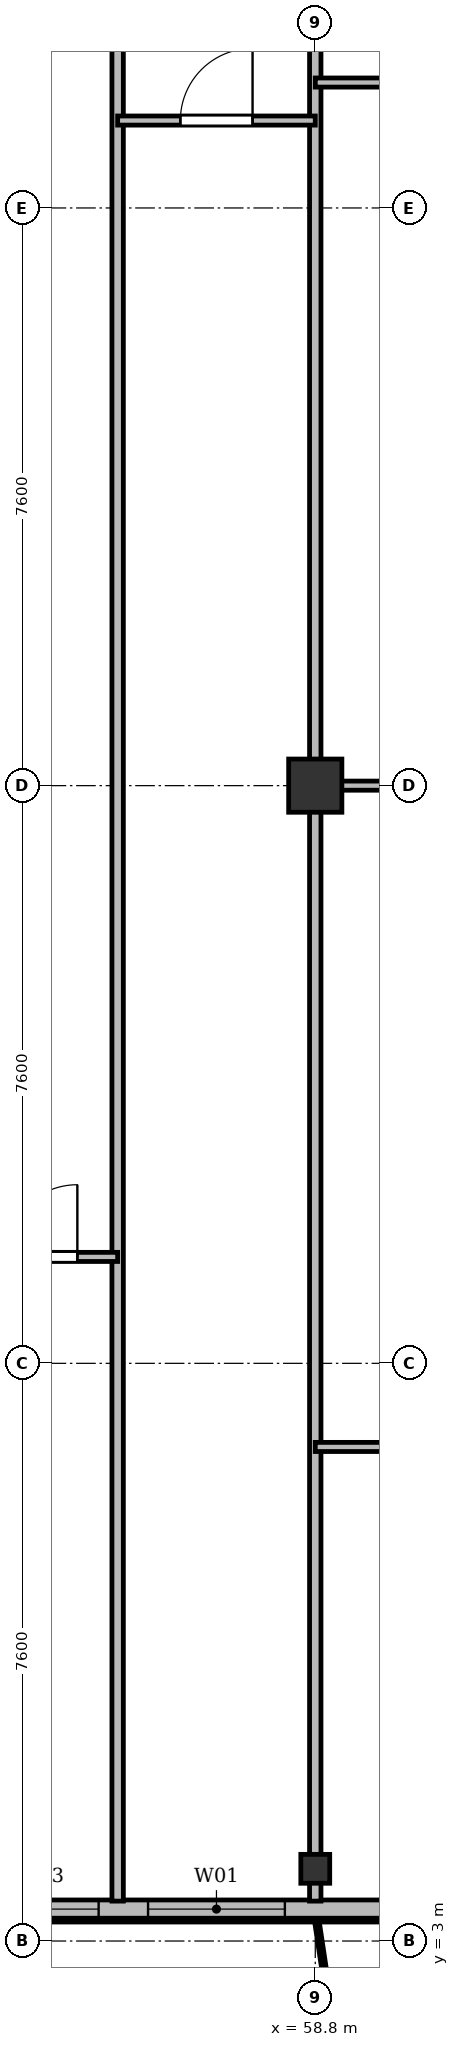
"""IFC4 building model, lengths in metres.
Left out: names, types, materials, properties, quantities, classifications, styles, units other than length and angle.
Written with IfcOpenShell. Run it as: python <this file> out.ifc"""

import sys

from ifc_helpers import new_model, si_unit, direction, frame, frame_2d, origin, origin_2d, place, context, subcontext, project, spatial, rectangle, i_section, extrude, source, transform, mapped, element, fill, save


model = new_model("IFC4")
c1 = context("Model", 3, precision=1e-05, world=origin(), true_north=direction((0.0, 1.0)))
c2 = subcontext(c1, "Body", "Model", "MODEL_VIEW")
j1 = project(units=[si_unit("LENGTHUNIT", "METRE"), si_unit("PLANEANGLEUNIT", "RADIAN")], contexts=[c1])
p1 = place(None, origin())
s1 = spatial("IfcSite", under=j1, at=p1, CompositionType="ELEMENT")
p2 = place(p1, origin())
s2 = spatial("IfcBuilding", under=s1, at=p2, CompositionType="ELEMENT")
p3 = place(p2, frame((0.0, 0.0, 168.1)))
s3 = spatial("IfcBuildingStorey", under=s2, at=p3, CompositionType="ELEMENT", Elevation=168.1)
m1 = source(origin(), c2, "Body", "SweptSolid", [
    extrude(i_section(OverallWidth=0.38, OverallDepth=0.38, WebThickness=0.02, FlangeThickness=0.03, at=origin_2d()), origin(), (0.0, 0.0, 1.0), 3.6),
])
p4 = place(p3, frame((58.8, 3.95, 0.0), z_axis=(0.0, 0.0, 1.0), x_axis=(1.0, 0.0, 0.0)))
e1 = element("IfcColumn", 1, at=p4, inside=s3, PredefinedType="COLUMN", context=c2, shape_type="MappedRepresentation", body=[
    mapped(m1, transform((0.0, 0.0, 0.0), x_axis=(1.0, 0.0, 0.0), y_axis=(0.0, 1.0, 0.0), z_axis=(0.0, 0.0, 1.0), scale=1.0)),
])
m2 = source(origin(), c2, "Body", "SweptSolid", [
    extrude(rectangle(XDim=0.7, YDim=0.7, at=origin_2d()), origin(), (0.0, 0.0, 1.0), 3.6),
])
p5 = place(p3, frame((58.8, 18.2, 0.0), z_axis=(0.0, 0.0, 1.0), x_axis=(1.0, 0.0, 0.0)))
e2 = element("IfcColumn", 2, at=p5, inside=s3, PredefinedType="COLUMN", context=c2, shape_type="MappedRepresentation", body=[
    mapped(m2, transform((0.0, 0.0, 0.0), x_axis=(1.0, 0.0, 0.0), y_axis=(0.0, 1.0, 0.0), z_axis=(0.0, 0.0, 1.0), scale=1.0)),
])
p6 = place(p3, frame((63.6, 3.42, 0.0), z_axis=(0.0, 0.0, 1.0), x_axis=(-1.0, 0.0, 0.0)))
e3 = element("IfcWall", 3, at=p6, inside=s3, PredefinedType="SOLIDWALL", context=c2, shape_type="SweptSolid", body=[
    extrude(rectangle(XDim=52.8, YDim=0.24, at=frame_2d((26.4, 0.0))), origin(), (0.0, 0.0, 1.0), 3.35),
])
p7 = place(p6, frame((1.62, 0.0, 0.9)))
e4 = element("IfcOpeningElement", 4, at=p7, cuts=e3, PredefinedType="OPENING", context=c2, shape_type="SweptSolid", body=[
    extrude(rectangle(XDim=1.65, YDim=1.85, at=frame_2d((0.825, 0.925))), frame((0.0, 0.13, 0.0), z_axis=(0.0, -1.0, 0.0), x_axis=(1.0, 0.0, 0.0)), (0.0, 0.0, 1.0), 0.26),
])
p8 = place(p6, frame((5.2, 0.0, 0.9)))
e5 = element("IfcOpeningElement", 5, at=p8, cuts=e3, PredefinedType="OPENING", context=c2, shape_type="SweptSolid", body=[
    extrude(rectangle(XDim=1.8, YDim=1.8, at=frame_2d((0.9, 0.9))), frame((0.0, 0.13, 0.0), z_axis=(0.0, -1.0, 0.0), x_axis=(1.0, 0.0, 0.0)), (0.0, 0.0, 1.0), 0.26),
])
p9 = place(p6, frame((7.65, 0.0, 0.9)))
e6 = element("IfcOpeningElement", 6, at=p9, cuts=e3, PredefinedType="OPENING", context=c2, shape_type="SweptSolid", body=[
    extrude(rectangle(XDim=1.5, YDim=1.75, at=frame_2d((0.75, 0.875))), frame((0.0, 0.13, 0.0), z_axis=(0.0, -1.0, 0.0), x_axis=(1.0, 0.0, 0.0)), (0.0, 0.0, 1.0), 0.26),
])
p10 = place(p6, frame((10.25, 0.0, 0.9)))
e7 = element("IfcOpeningElement", 7, at=p10, cuts=e3, PredefinedType="OPENING", context=c2, shape_type="SweptSolid", body=[
    extrude(rectangle(XDim=1.5, YDim=1.75, at=frame_2d((0.75, 0.875))), frame((0.0, 0.13, 0.0), z_axis=(0.0, -1.0, 0.0), x_axis=(1.0, 0.0, 0.0)), (0.0, 0.0, 1.0), 0.26),
])
p11 = place(p6, frame((13.62, 0.0, 0.0)))
e8 = element("IfcOpeningElement", 8, at=p11, cuts=e3, PredefinedType="OPENING", context=c2, shape_type="SweptSolid", body=[
    extrude(rectangle(XDim=1.2, YDim=2.2, at=frame_2d((0.6, 1.1))), frame((0.0, 0.13, 0.0), z_axis=(0.0, -1.0, 0.0), x_axis=(1.0, 0.0, 0.0)), (0.0, 0.0, 1.0), 0.26),
])
p12 = place(p6, frame((15.375, 0.0, 0.9)))
e9 = element("IfcOpeningElement", 9, at=p12, cuts=e3, PredefinedType="OPENING", context=c2, shape_type="SweptSolid", body=[
    extrude(rectangle(XDim=1.65, YDim=1.85, at=frame_2d((0.825, 0.925))), frame((0.0, 0.13, 0.0), z_axis=(0.0, -1.0, 0.0), x_axis=(1.0, 0.0, 0.0)), (0.0, 0.0, 1.0), 0.26),
])
p13 = place(p6, frame((17.7, 0.0, 0.9)))
e10 = element("IfcOpeningElement", 10, at=p13, cuts=e3, PredefinedType="OPENING", context=c2, shape_type="SweptSolid", body=[
    extrude(rectangle(XDim=1.8, YDim=1.8, at=frame_2d((0.9, 0.9))), frame((0.0, 0.13, 0.0), z_axis=(0.0, -1.0, 0.0), x_axis=(1.0, 0.0, 0.0)), (0.0, 0.0, 1.0), 0.26),
])
p14 = place(p6, frame((22.0, 0.0, 0.9)))
e11 = element("IfcOpeningElement", 11, at=p14, cuts=e3, PredefinedType="OPENING", context=c2, shape_type="SweptSolid", body=[
    extrude(rectangle(XDim=2.2, YDim=1.8, at=frame_2d((1.1, 0.9))), frame((0.0, 0.13, 0.0), z_axis=(0.0, -1.0, 0.0), x_axis=(1.0, 0.0, 0.0)), (0.0, 0.0, 1.0), 0.26),
])
p15 = place(p6, frame((28.95, 0.0, 0.9)))
e12 = element("IfcOpeningElement", 12, at=p15, cuts=e3, PredefinedType="OPENING", context=c2, shape_type="SweptSolid", body=[
    extrude(rectangle(XDim=1.5, YDim=1.75, at=frame_2d((0.75, 0.875))), frame((0.0, 0.13, 0.0), z_axis=(0.0, -1.0, 0.0), x_axis=(1.0, 0.0, 0.0)), (0.0, 0.0, 1.0), 0.26),
])
p16 = place(p6, frame((35.6, 0.0, 0.9)))
e13 = element("IfcOpeningElement", 13, at=p16, cuts=e3, PredefinedType="OPENING", context=c2, shape_type="SweptSolid", body=[
    extrude(rectangle(XDim=2.0, YDim=1.95, at=frame_2d((1.0, 0.975))), frame((0.0, 0.13, 0.0), z_axis=(0.0, -1.0, 0.0), x_axis=(1.0, 0.0, 0.0)), (0.0, 0.0, 1.0), 0.26),
])
p17 = place(p6, frame((41.656, 0.0, 0.0)))
e14 = element("IfcOpeningElement", 14, at=p17, cuts=e3, PredefinedType="OPENING", context=c2, shape_type="SweptSolid", body=[
    extrude(rectangle(XDim=1.2, YDim=2.2, at=frame_2d((0.6, 1.1))), frame((0.0, 0.13, 0.0), z_axis=(0.0, -1.0, 0.0), x_axis=(1.0, 0.0, 0.0)), (0.0, 0.0, 1.0), 0.26),
])
p18 = place(p6, frame((43.65, 0.0, 0.9)))
e15 = element("IfcOpeningElement", 15, at=p18, cuts=e3, PredefinedType="OPENING", context=c2, shape_type="SweptSolid", body=[
    extrude(rectangle(XDim=1.5, YDim=1.75, at=frame_2d((0.75, 0.875))), frame((0.0, 0.13, 0.0), z_axis=(0.0, -1.0, 0.0), x_axis=(1.0, 0.0, 0.0)), (0.0, 0.0, 1.0), 0.26),
])
p19 = place(p6, frame((45.95, 0.0, 0.9)))
e16 = element("IfcOpeningElement", 16, at=p19, cuts=e3, PredefinedType="OPENING", context=c2, shape_type="SweptSolid", body=[
    extrude(rectangle(XDim=1.5, YDim=1.75, at=frame_2d((0.75, 0.875))), frame((0.0, 0.13, 0.0), z_axis=(0.0, -1.0, 0.0), x_axis=(1.0, 0.0, 0.0)), (0.0, 0.0, 1.0), 0.26),
])
p20 = place(p6, frame((49.605, 0.0, 0.9)))
e17 = element("IfcOpeningElement", 17, at=p20, cuts=e3, PredefinedType="OPENING", context=c2, shape_type="SweptSolid", body=[
    extrude(rectangle(XDim=1.5, YDim=1.75, at=frame_2d((0.75, 0.875))), frame((0.0, 0.13, 0.0), z_axis=(0.0, -1.0, 0.0), x_axis=(1.0, 0.0, 0.0)), (0.0, 0.0, 1.0), 0.26),
])
p21 = place(p3, frame((58.8, 3.525, 0.0), z_axis=(0.0, 0.0, 1.0), x_axis=(0.0, 1.0, 0.0)))
e18 = element("IfcWall", 18, at=p21, inside=s3, PredefinedType="PARTITIONING", context=c2, shape_type="SweptSolid", body=[
    extrude(rectangle(XDim=27.275, YDim=0.15, at=frame_2d((13.638, 0.0))), origin(), (0.0, 0.0, 1.0), 2.85),
])
p22 = place(p3, frame((56.2, 3.525, 0.0), z_axis=(0.0, 0.0, 1.0), x_axis=(0.0, 1.0, 0.0)))
e19 = element("IfcWall", 19, at=p22, inside=s3, PredefinedType="PARTITIONING", context=c2, shape_type="SweptSolid", body=[
    extrude(rectangle(XDim=27.275, YDim=0.15, at=frame_2d((13.638, 0.0))), origin(), (0.0, 0.0, 1.0), 2.75),
])
p23 = place(p3, frame((54.2, 12.0, 0.0), z_axis=(0.0, 0.0, 1.0), x_axis=(1.0, 0.0, 0.0)))
e20 = element("IfcWall", 20, at=p23, inside=s3, PredefinedType="PARTITIONING", context=c2, shape_type="SweptSolid", body=[
    extrude(rectangle(XDim=2.0, YDim=0.12, at=frame_2d((1.0, 0.0))), origin(), (0.0, 0.0, 1.0), 3.35),
])
p24 = place(p23, frame((0.52, 0.0, 0.0)))
e21 = element("IfcOpeningElement", 21, at=p24, cuts=e20, PredefinedType="OPENING", context=c2, shape_type="SweptSolid", body=[
    extrude(rectangle(XDim=0.95, YDim=2.15, at=frame_2d((0.475, 1.075))), frame((0.0, 0.07, 0.0), z_axis=(0.0, -1.0, 0.0), x_axis=(1.0, 0.0, 0.0)), (0.0, 0.0, 1.0), 0.14),
])
p25 = place(p3, frame((56.2, 26.95, 0.0), z_axis=(0.0, 0.0, 1.0), x_axis=(1.0, 0.0, 0.0)))
e22 = element("IfcWall", 22, at=p25, inside=s3, PredefinedType="PARTITIONING", context=c2, shape_type="SweptSolid", body=[
    extrude(rectangle(XDim=2.6, YDim=0.12, at=frame_2d((1.3, 0.0))), origin(), (0.0, 0.0, 1.0), 2.85),
])
p26 = place(p25, frame((0.825, 0.0, 0.0)))
e23 = element("IfcOpeningElement", 23, at=p26, cuts=e22, PredefinedType="OPENING", context=c2, shape_type="SweptSolid", body=[
    extrude(rectangle(XDim=0.95, YDim=2.15, at=frame_2d((0.475, 1.075))), frame((0.0, 0.07, 0.0), z_axis=(0.0, -1.0, 0.0), x_axis=(1.0, 0.0, 0.0)), (0.0, 0.0, 1.0), 0.14),
])
p27 = place(p3, frame((58.8, 18.2, 0.0), z_axis=(0.0, 0.0, 1.0), x_axis=(1.0, 0.0, 0.0)))
e24 = element("IfcWall", 24, at=p27, inside=s3, PredefinedType="PARTITIONING", context=c2, shape_type="SweptSolid", body=[
    extrude(rectangle(XDim=7.56, YDim=0.12, at=frame_2d((3.78, 0.0))), origin(), (0.0, 0.0, 1.0), 2.75),
])
p28 = place(p27, frame((3.305, 0.0, 0.0)))
e25 = element("IfcOpeningElement", 25, at=p28, cuts=e24, PredefinedType="OPENING", context=c2, shape_type="SweptSolid", body=[
    extrude(rectangle(XDim=0.95, YDim=2.15, at=frame_2d((0.475, 1.075))), frame((0.0, 0.07, 0.0), z_axis=(0.0, -1.0, 0.0), x_axis=(1.0, 0.0, 0.0)), (0.0, 0.0, 1.0), 0.14),
])
p29 = place(p3, frame((58.8, 27.45, 0.0), z_axis=(0.0, 0.0, 1.0), x_axis=(1.0, 0.0, 0.0)))
e26 = element("IfcWall", 26, at=p29, inside=s3, PredefinedType="PARTITIONING", context=c2, shape_type="SweptSolid", body=[
    extrude(rectangle(XDim=2.4, YDim=0.12, at=frame_2d((1.2, 0.0))), origin(), (0.0, 0.0, 1.0), 2.85),
])
p30 = place(p3, frame((58.8, 9.5, 0.0), z_axis=(0.0, 0.0, 1.0), x_axis=(1.0, 0.0, 0.0)))
e27 = element("IfcWall", 27, at=p30, inside=s3, PredefinedType="PARTITIONING", context=c2, shape_type="SweptSolid", body=[
    extrude(rectangle(XDim=7.56, YDim=0.12, at=frame_2d((3.78, 0.0))), origin(), (0.0, 0.0, 1.0), 2.85),
])
p31 = place(p30, frame((3.305, 0.0, 0.0)))
e28 = element("IfcOpeningElement", 28, at=p31, cuts=e27, PredefinedType="OPENING", context=c2, shape_type="SweptSolid", body=[
    extrude(rectangle(XDim=0.95, YDim=2.15, at=frame_2d((0.475, 1.075))), frame((0.0, 0.07, 0.0), z_axis=(0.0, -1.0, 0.0), x_axis=(1.0, 0.0, 0.0)), (0.0, 0.0, 1.0), 0.14),
])
m3 = source(origin(), c2, "Body", "SweptSolid", [
    extrude(rectangle(XDim=1.8, YDim=1.8, at=frame_2d((0.9, 0.9))), frame((0.0, 0.03, 0.0), z_axis=(0.0, -1.0, 0.0), x_axis=(1.0, 0.0, 0.0)), (0.0, 0.0, 1.0), 0.06),
])
p32 = place(p8, origin())
e29 = element("IfcWindow", 29, at=p32, inside=s3, PartitioningType="SINGLE_PANEL", PredefinedType="WINDOW", context=c2, shape_type="MappedRepresentation", body=[
    mapped(m3, transform((0.0, 0.0, 0.0), x_axis=(1.0, 0.0, 0.0), y_axis=(0.0, 1.0, 0.0), z_axis=(0.0, 0.0, 1.0), scale=1.0)),
])
fill(e5, e29)
m4 = source(origin(), c2, "Body", "SweptSolid", [
    extrude(rectangle(XDim=1.5, YDim=1.75, at=frame_2d((0.75, 0.875))), frame((0.0, 0.03, 0.0), z_axis=(0.0, -1.0, 0.0), x_axis=(1.0, 0.0, 0.0)), (0.0, 0.0, 1.0), 0.06),
])
p33 = place(p9, origin())
e30 = element("IfcWindow", 30, at=p33, inside=s3, PartitioningType="SINGLE_PANEL", PredefinedType="WINDOW", context=c2, shape_type="MappedRepresentation", body=[
    mapped(m4, transform((0.0, 0.0, 0.0), x_axis=(1.0, 0.0, 0.0), y_axis=(0.0, 1.0, 0.0), z_axis=(0.0, 0.0, 1.0), scale=1.0)),
])
fill(e6, e30)
m5 = source(origin(), c2, "Body", "SweptSolid", [
    extrude(rectangle(XDim=0.95, YDim=2.15, at=frame_2d((0.475, 1.075))), frame((0.0, 0.025, 0.0), z_axis=(0.0, -1.0, 0.0), x_axis=(1.0, 0.0, 0.0)), (0.0, 0.0, 1.0), 0.05),
])
p34 = place(p24, origin())
e31 = element("IfcDoor", 31, at=p34, inside=s3, OperationType="SINGLE_SWING_RIGHT", PredefinedType="DOOR", context=c2, shape_type="MappedRepresentation", body=[
    mapped(m5, transform((0.0, 0.0, 0.0), x_axis=(1.0, 0.0, 0.0), y_axis=(0.0, 1.0, 0.0), z_axis=(0.0, 0.0, 1.0), scale=1.0)),
])
fill(e21, e31)
p35 = place(p26, origin())
e32 = element("IfcDoor", 32, at=p35, inside=s3, OperationType="SINGLE_SWING_RIGHT", PredefinedType="DOOR", context=c2, shape_type="MappedRepresentation", body=[
    mapped(m5, transform((0.0, 0.0, 0.0), x_axis=(1.0, 0.0, 0.0), y_axis=(0.0, 1.0, 0.0), z_axis=(0.0, 0.0, 1.0), scale=1.0)),
])
fill(e23, e32)
save(model, sys.argv[1])
